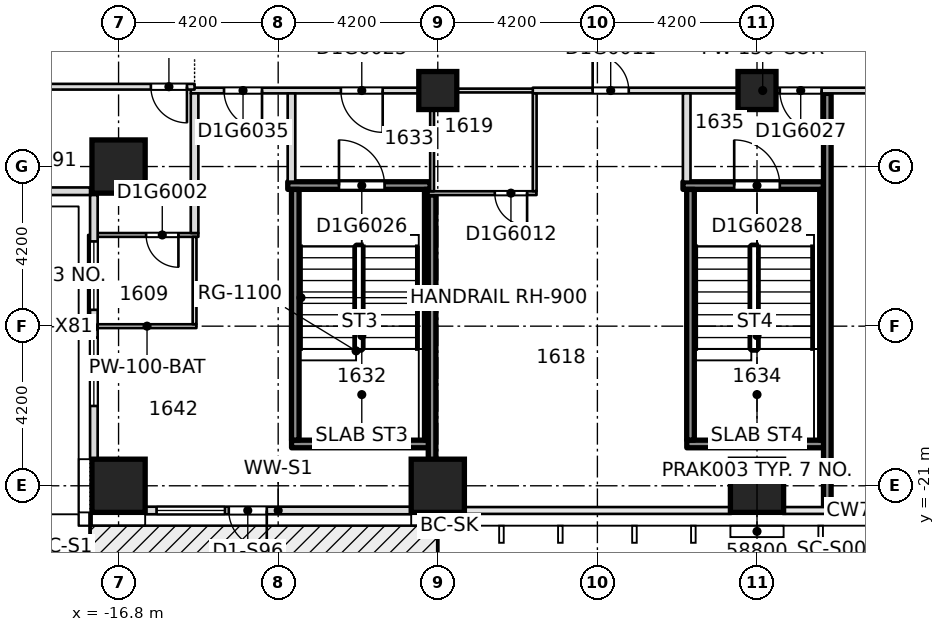
"""IFC4 building model, lengths in metres.
Left out: names, types, materials, properties, quantities, classifications, styles, units other than length and angle.
Written with IfcOpenShell. Run it as: python <this file> out.ifc"""

import sys

from ifc_helpers import new_model, si_unit, direction, frame, frame_2d, origin, origin_2d, place, context, subcontext, project, spatial, rectangle, extrude, element, fill, save


model = new_model("IFC4")
c1 = context("Model", 3, precision=1e-05, world=origin(), true_north=direction((0.0, 1.0)))
c2 = subcontext(c1, "Body", "Model", "MODEL_VIEW")
j1 = project(units=[si_unit("LENGTHUNIT", "METRE"), si_unit("PLANEANGLEUNIT", "RADIAN")], contexts=[c1])
p1 = place(None, origin())
s1 = spatial("IfcSite", under=j1, at=p1, CompositionType="ELEMENT")
p2 = place(p1, origin())
s2 = spatial("IfcBuilding", under=s1, at=p2, CompositionType="ELEMENT")
p3 = place(p2, frame((0.0, 0.0, 69.0)))
s3 = spatial("IfcBuildingStorey", under=s2, at=p3, CompositionType="ELEMENT", Elevation=69.0)
for number, where, z_axis, x_axis in (
    (1, (-16.8, -21.0, -0.32), (0.0, 0.0, 1.0), (1.0, 0.0, 0.0)),
    (2, (-8.4, -21.0, -0.32), (0.0, 0.0, 1.0), (1.0, 0.0, 0.0)),
    (3, (0.0, -21.0, -0.32), (0.0, 0.0, 1.0), (1.0, 0.0, 0.0)),
    (4, (-16.8, -12.6, -0.32), (0.0, 0.0, 1.0), (1.0, 0.0, 0.0)),
):
    element("IfcColumn", number, at=place(p3, frame(where, z_axis=z_axis, x_axis=x_axis)), inside=s3, PredefinedType="COLUMN", context=c2, shape_type="SweptSolid", body=[
        extrude(rectangle(XDim=1.4, YDim=1.4, at=origin_2d()), origin(), (0.0, 0.0, 1.0), 3.45),
    ])
for number, where, z_axis, x_axis in (
    (5, (-8.4, -10.6, -0.32), (0.0, 0.0, 1.0), (1.0, 0.0, 0.0)),
    (6, (0.0, -10.6, -0.32), (0.0, 0.0, 1.0), (1.0, 0.0, 0.0)),
):
    element("IfcColumn", number, at=place(p3, frame(where, z_axis=z_axis, x_axis=x_axis)), inside=s3, PredefinedType="COLUMN", context=c2, shape_type="SweptSolid", body=[
        extrude(rectangle(XDim=1.0, YDim=1.0, at=origin_2d()), origin(), (0.0, 0.0, 1.0), 3.45),
    ])
p4 = place(p3, frame((-12.248, -19.9, 0.0), z_axis=(0.0, 0.0, 1.0), x_axis=(1.0, 0.0, 0.0)))
e7 = element("IfcWall", 7, at=p4, inside=s3, PredefinedType="SOLIDWALL", context=c2, shape_type="SweptSolid", body=[
    extrude(rectangle(XDim=3.696, YDim=0.2, at=frame_2d((1.848, 0.0))), origin(), (0.0, 0.0, 1.0), 3.13),
])
p5 = place(p3, frame((-1.848, -19.9, 0.0), z_axis=(0.0, 0.0, 1.0), x_axis=(1.0, 0.0, 0.0)))
e8 = element("IfcWall", 8, at=p5, inside=s3, PredefinedType="SOLIDWALL", context=c2, shape_type="SweptSolid", body=[
    extrude(rectangle(XDim=3.696, YDim=0.2, at=frame_2d((1.848, 0.0))), origin(), (0.0, 0.0, 1.0), 3.13),
])
p6 = place(p3, frame((-17.35, -16.8, 0.0), z_axis=(0.0, 0.0, 1.0), x_axis=(1.0, 0.0, 0.0)))
e9 = element("IfcWall", 9, at=p6, inside=s3, PredefinedType="PARTITIONING", context=c2, shape_type="SweptSolid", body=[
    extrude(rectangle(XDim=2.598, YDim=0.1, at=frame_2d((1.299, 0.0))), origin(), (0.0, 0.0, 1.0), 3.13),
])
p7 = place(p3, frame((-17.35, -14.4, 0.0), z_axis=(0.0, 0.0, 1.0), x_axis=(1.0, 0.0, 0.0)))
e10 = element("IfcWall", 10, at=p7, inside=s3, PredefinedType="PARTITIONING", context=c2, shape_type="SweptSolid", body=[
    extrude(rectangle(XDim=2.65, YDim=0.1, at=frame_2d((1.325, 0.0))), origin(), (0.0, 0.0, 1.0), 3.13),
])
p8 = place(p7, frame((1.275, 0.0, 0.0)))
e11 = element("IfcOpeningElement", 11, at=p8, cuts=e10, PredefinedType="OPENING", context=c2, shape_type="SweptSolid", body=[
    extrude(rectangle(XDim=0.85, YDim=2.1, at=frame_2d((0.425, 1.05))), frame((0.0, 0.06, 0.0), z_axis=(0.0, -1.0, 0.0), x_axis=(1.0, 0.0, 0.0)), (0.0, 0.0, 1.0), 0.12),
])
p9 = place(p3, frame((-8.65, -13.3, 0.0), z_axis=(0.0, 0.0, 1.0), x_axis=(1.0, 0.0, 0.0)))
e12 = element("IfcWall", 12, at=p9, inside=s3, PredefinedType="PARTITIONING", context=c2, shape_type="SweptSolid", body=[
    extrude(rectangle(XDim=2.848, YDim=0.1, at=frame_2d((1.424, 0.0))), origin(), (0.0, 0.0, 1.0), 3.13),
])
p10 = place(p9, frame((1.75, 0.0, 0.0)))
e13 = element("IfcOpeningElement", 13, at=p10, cuts=e12, PredefinedType="OPENING", context=c2, shape_type="SweptSolid", body=[
    extrude(rectangle(XDim=0.85, YDim=2.1, at=frame_2d((0.425, 1.05))), frame((0.0, 0.06, 0.0), z_axis=(0.0, -1.0, 0.0), x_axis=(1.0, 0.0, 0.0)), (0.0, 0.0, 1.0), 0.12),
])
p11 = place(p3, frame((-12.348, -13.1, 0.0), z_axis=(0.0, 0.0, 1.0), x_axis=(1.0, 0.0, 0.0)))
e14 = element("IfcWall", 14, at=p11, inside=s3, PredefinedType="SOLIDWALL", context=c2, shape_type="SweptSolid", body=[
    extrude(rectangle(XDim=3.746, YDim=0.2, at=frame_2d((1.873, 0.0))), origin(), (0.0, 0.0, 1.0), 3.13),
])
p12 = place(p11, frame((1.348, 0.0, 0.0)))
e15 = element("IfcOpeningElement", 15, at=p12, cuts=e14, PredefinedType="OPENING", context=c2, shape_type="SweptSolid", body=[
    extrude(rectangle(XDim=1.2, YDim=2.1, at=frame_2d((0.6, 1.05))), frame((0.0, 0.11, 0.0), z_axis=(0.0, -1.0, 0.0), x_axis=(1.0, 0.0, 0.0)), (0.0, 0.0, 1.0), 0.22),
])
p13 = place(p3, frame((-1.948, -13.1, 0.0), z_axis=(0.0, 0.0, 1.0), x_axis=(1.0, 0.0, 0.0)))
e16 = element("IfcWall", 16, at=p13, inside=s3, PredefinedType="SOLIDWALL", context=c2, shape_type="SweptSolid", body=[
    extrude(rectangle(XDim=3.696, YDim=0.2, at=frame_2d((1.848, 0.0))), origin(), (0.0, 0.0, 1.0), 3.13),
])
p14 = place(p13, frame((1.348, 0.0, 0.0)))
e17 = element("IfcOpeningElement", 17, at=p14, cuts=e16, PredefinedType="OPENING", context=c2, shape_type="SweptSolid", body=[
    extrude(rectangle(XDim=1.2, YDim=2.1, at=frame_2d((0.6, 1.05))), frame((0.0, 0.11, 0.0), z_axis=(0.0, -1.0, 0.0), x_axis=(1.0, 0.0, 0.0)), (0.0, 0.0, 1.0), 0.22),
])
p15 = place(p3, frame((-14.9, -10.6, 0.0), z_axis=(0.0, 0.0, 1.0), x_axis=(1.0, 0.0, 0.0)))
e18 = element("IfcWall", 18, at=p15, inside=s3, PredefinedType="PARTITIONING", context=c2, shape_type="SweptSolid", body=[
    extrude(rectangle(XDim=6.4, YDim=0.15, at=frame_2d((3.2, 0.0))), origin(), (0.0, 0.0, 1.0), 3.13),
])
p16 = place(p15, frame((3.95, 0.0, 0.0)))
e19 = element("IfcOpeningElement", 19, at=p16, cuts=e18, PredefinedType="OPENING", context=c2, shape_type="SweptSolid", body=[
    extrude(rectangle(XDim=1.1, YDim=2.1, at=frame_2d((0.55, 1.05))), frame((0.0, 0.085, 0.0), z_axis=(0.0, -1.0, 0.0), x_axis=(1.0, 0.0, 0.0)), (0.0, 0.0, 1.0), 0.17),
])
p17 = place(p15, frame((0.875, 0.0, 0.0)))
e20 = element("IfcOpeningElement", 20, at=p17, cuts=e18, PredefinedType="OPENING", context=c2, shape_type="SweptSolid", body=[
    extrude(rectangle(XDim=1.0, YDim=2.1, at=frame_2d((0.5, 1.05))), frame((0.0, 0.085, 0.0), z_axis=(0.0, -1.0, 0.0), x_axis=(1.0, 0.0, 0.0)), (0.0, 0.0, 1.0), 0.17),
])
p18 = place(p3, frame((-8.6, -10.6, 0.0), z_axis=(0.0, 0.0, 1.0), x_axis=(1.0, 0.0, 0.0)))
e21 = element("IfcWall", 21, at=p18, inside=s3, PredefinedType="PARTITIONING", context=c2, shape_type="SweptSolid", body=[
    extrude(rectangle(XDim=2.8, YDim=0.1, at=frame_2d((1.4, 0.0))), origin(), (0.0, 0.0, 1.0), 3.13),
])
p19 = place(p3, frame((-5.9, -10.6, 0.0), z_axis=(0.0, 0.0, 1.0), x_axis=(1.0, 0.0, 0.0)))
e22 = element("IfcWall", 22, at=p19, inside=s3, PredefinedType="PARTITIONING", context=c2, shape_type="SweptSolid", body=[
    extrude(rectangle(XDim=12.1, YDim=0.15, at=frame_2d((6.05, 0.0))), origin(), (0.0, 0.0, 1.0), 3.13),
])
p20 = place(p19, frame((1.575, 0.0, 0.0)))
e23 = element("IfcOpeningElement", 23, at=p20, cuts=e22, PredefinedType="OPENING", context=c2, shape_type="SweptSolid", body=[
    extrude(rectangle(XDim=0.95, YDim=2.1, at=frame_2d((0.475, 1.05))), frame((0.0, 0.085, 0.0), z_axis=(0.0, -1.0, 0.0), x_axis=(1.0, 0.0, 0.0)), (0.0, 0.0, 1.0), 0.17),
])
p21 = place(p19, frame((9.425, 0.0, 0.0)))
e24 = element("IfcOpeningElement", 24, at=p21, cuts=e22, PredefinedType="OPENING", context=c2, shape_type="SweptSolid", body=[
    extrude(rectangle(XDim=0.95, YDim=2.1, at=frame_2d((0.475, 1.05))), frame((0.0, 0.085, 0.0), z_axis=(0.0, -1.0, 0.0), x_axis=(1.0, 0.0, 0.0)), (0.0, 0.0, 1.0), 0.17),
])
p22 = place(p19, frame((6.5, 0.0, 0.0)))
e25 = element("IfcOpeningElement", 25, at=p22, cuts=e22, PredefinedType="OPENING", context=c2, shape_type="SweptSolid", body=[
    extrude(rectangle(XDim=1.1, YDim=2.1, at=frame_2d((0.55, 1.05))), frame((0.0, 0.085, 0.0), z_axis=(0.0, -1.0, 0.0), x_axis=(1.0, 0.0, 0.0)), (0.0, 0.0, 1.0), 0.17),
])
p23 = place(p3, frame((-25.75, -10.5, 0.0), z_axis=(0.0, 0.0, 1.0), x_axis=(1.0, 0.0, 0.0)))
e26 = element("IfcWall", 26, at=p23, inside=s3, PredefinedType="PARTITIONING", context=c2, shape_type="SweptSolid", body=[
    extrude(rectangle(XDim=10.95, YDim=0.15, at=frame_2d((5.475, 0.0))), origin(), (0.0, 0.0, 1.0), 3.13),
])
p24 = place(p23, frame((9.8, 0.0, 0.0)))
e27 = element("IfcOpeningElement", 27, at=p24, cuts=e26, PredefinedType="OPENING", context=c2, shape_type="SweptSolid", body=[
    extrude(rectangle(XDim=0.95, YDim=2.1, at=frame_2d((0.475, 1.05))), frame((0.0, 0.085, 0.0), z_axis=(0.0, -1.0, 0.0), x_axis=(1.0, 0.0, 0.0)), (0.0, 0.0, 1.0), 0.17),
])
p25 = place(p3, frame((-17.55, -16.75, 0.0), z_axis=(0.0, 0.0, 1.0), x_axis=(0.0, 1.0, 0.0)))
e28 = element("IfcWall", 28, at=p25, inside=s3, PredefinedType="PARTITIONING", context=c2, shape_type="SweptSolid", body=[
    extrude(rectangle(XDim=2.35, YDim=0.1, at=frame_2d((1.175, 0.0))), origin(), (0.0, 0.0, 1.0), 3.13),
])
p26 = place(p3, frame((-14.8, -16.748, 0.0), z_axis=(0.0, 0.0, 1.0), x_axis=(0.0, 1.0, 0.0)))
e29 = element("IfcWall", 29, at=p26, inside=s3, PredefinedType="PARTITIONING", context=c2, shape_type="SweptSolid", body=[
    extrude(rectangle(XDim=2.298, YDim=0.1, at=frame_2d((1.149, 0.0))), origin(), (0.0, 0.0, 1.0), 3.13),
])
p27 = place(p3, frame((-14.8, -14.35, 0.0), z_axis=(0.0, 0.0, 1.0), x_axis=(0.0, 1.0, 0.0)))
e30 = element("IfcWall", 30, at=p27, inside=s3, PredefinedType="PARTITIONING", context=c2, shape_type="SweptSolid", body=[
    extrude(rectangle(XDim=3.675, YDim=0.2, at=frame_2d((1.837, 0.0))), origin(), (0.0, 0.0, 1.0), 3.13),
])
p28 = place(p3, frame((-12.25, -12.998, 0.0), z_axis=(0.0, 0.0, 1.0), x_axis=(0.0, 1.0, 0.0)))
e31 = element("IfcWall", 31, at=p28, inside=s3, PredefinedType="PARTITIONING", context=c2, shape_type="SweptSolid", body=[
    extrude(rectangle(XDim=2.323, YDim=0.2, at=frame_2d((1.162, 0.0))), origin(), (0.0, 0.0, 1.0), 3.13),
])
for number, where, z_axis, x_axis in (
    (32, (-12.15, -19.798, 0.0), (0.0, 0.0, 1.0), (0.0, 1.0, 0.0)),
    (33, (-8.65, -19.798, 0.0), (0.0, 0.0, 1.0), (0.0, 1.0, 0.0)),
):
    element("IfcWall", number, at=place(p3, frame(where, z_axis=z_axis, x_axis=x_axis)), inside=s3, PredefinedType="SOLIDWALL", context=c2, shape_type="SweptSolid", body=[
        extrude(rectangle(XDim=6.596, YDim=0.2, at=frame_2d((3.298, 0.0))), origin(), (0.0, 0.0, 1.0), 3.13),
    ])
p29 = place(p3, frame((-8.55, -13.25, 0.0), z_axis=(0.0, 0.0, 1.0), x_axis=(0.0, 1.0, 0.0)))
e34 = element("IfcWall", 34, at=p29, inside=s3, PredefinedType="PARTITIONING", context=c2, shape_type="SweptSolid", body=[
    extrude(rectangle(XDim=2.575, YDim=0.1, at=frame_2d((1.288, 0.0))), origin(), (0.0, 0.0, 1.0), 3.13),
])
p30 = place(p3, frame((-5.85, -13.248, 0.0), z_axis=(0.0, 0.0, 1.0), x_axis=(0.0, 1.0, 0.0)))
e35 = element("IfcWall", 35, at=p30, inside=s3, PredefinedType="PARTITIONING", context=c2, shape_type="SweptSolid", body=[
    extrude(rectangle(XDim=2.573, YDim=0.1, at=frame_2d((1.287, 0.0))), origin(), (0.0, 0.0, 1.0), 3.13),
])
p31 = place(p3, frame((-1.85, -12.998, 0.0), z_axis=(0.0, 0.0, 1.0), x_axis=(0.0, 1.0, 0.0)))
e36 = element("IfcWall", 36, at=p31, inside=s3, PredefinedType="PARTITIONING", context=c2, shape_type="SweptSolid", body=[
    extrude(rectangle(XDim=2.323, YDim=0.2, at=frame_2d((1.162, 0.0))), origin(), (0.0, 0.0, 1.0), 3.13),
])
for number, where, z_axis, x_axis in (
    (37, (-1.75, -19.798, 0.0), (0.0, 0.0, 1.0), (0.0, 1.0, 0.0)),
    (38, (1.75, -19.798, 0.0), (0.0, 0.0, 1.0), (0.0, 1.0, 0.0)),
):
    element("IfcWall", number, at=place(p3, frame(where, z_axis=z_axis, x_axis=x_axis)), inside=s3, PredefinedType="SOLIDWALL", context=c2, shape_type="SweptSolid", body=[
        extrude(rectangle(XDim=6.596, YDim=0.2, at=frame_2d((3.298, 0.0))), origin(), (0.0, 0.0, 1.0), 3.13),
    ])
p32 = place(p3, frame((-16.1, -21.65, 0.0), z_axis=(0.0, 0.0, 1.0), x_axis=(1.0, 0.0, 0.0)))
e39 = element("IfcWall", 39, at=p32, inside=s3, PredefinedType="STANDARD", context=c2, shape_type="SweptSolid", body=[
    extrude(rectangle(XDim=7.0, YDim=0.2, at=frame_2d((3.5, 0.0))), origin(), (0.0, 0.0, 1.0), 3.13),
])
p33 = place(p32, frame((0.3, 0.0, 0.2)))
e40 = element("IfcOpeningElement", 40, at=p33, cuts=e39, PredefinedType="OPENING", context=c2, shape_type="SweptSolid", body=[
    extrude(rectangle(XDim=1.8, YDim=2.65, at=frame_2d((0.9, 1.325))), frame((0.0, 0.11, 0.0), z_axis=(0.0, -1.0, 0.0), x_axis=(1.0, 0.0, 0.0)), (0.0, 0.0, 1.0), 0.22),
])
p34 = place(p32, frame((2.2, 0.0, 0.0)))
e41 = element("IfcOpeningElement", 41, at=p34, cuts=e39, PredefinedType="OPENING", context=c2, shape_type="SweptSolid", body=[
    extrude(rectangle(XDim=1.0, YDim=2.4, at=frame_2d((0.5, 1.2))), frame((0.0, 0.11, 0.0), z_axis=(0.0, -1.0, 0.0), x_axis=(1.0, 0.0, 0.0)), (0.0, 0.0, 1.0), 0.22),
])
p35 = place(p3, frame((-24.5, -13.25, 0.0), z_axis=(0.0, 0.0, 1.0), x_axis=(1.0, 0.0, 0.0)))
e42 = element("IfcWall", 42, at=p35, inside=s3, PredefinedType="STANDARD", context=c2, shape_type="SweptSolid", body=[
    extrude(rectangle(XDim=6.95, YDim=0.2, at=frame_2d((3.475, 0.0))), origin(), (0.0, 0.0, 1.0), 3.13),
])
p36 = place(p35, frame((2.6, 0.0, 0.2)))
e43 = element("IfcOpeningElement", 43, at=p36, cuts=e42, PredefinedType="OPENING", context=c2, shape_type="SweptSolid", body=[
    extrude(rectangle(XDim=1.8, YDim=2.65, at=frame_2d((0.9, 1.325))), frame((0.0, 0.11, 0.0), z_axis=(0.0, -1.0, 0.0), x_axis=(1.0, 0.0, 0.0)), (0.0, 0.0, 1.0), 0.22),
])
p37 = place(p3, frame((-17.45, -13.35, 0.0), z_axis=(0.0, 0.0, 1.0), x_axis=(0.0, -1.0, 0.0)))
e44 = element("IfcWall", 44, at=p37, inside=s3, PredefinedType="STANDARD", context=c2, shape_type="SweptSolid", body=[
    extrude(rectangle(XDim=6.95, YDim=0.2, at=frame_2d((3.475, 0.0))), origin(), (0.0, 0.0, 1.0), 3.13),
])
p38 = place(p37, frame((3.75, 0.0, 0.2)))
e45 = element("IfcOpeningElement", 45, at=p38, cuts=e44, PredefinedType="OPENING", context=c2, shape_type="SweptSolid", body=[
    extrude(rectangle(XDim=1.8, YDim=2.65, at=frame_2d((0.9, 1.325))), frame((0.0, 0.11, 0.0), z_axis=(0.0, -1.0, 0.0), x_axis=(1.0, 0.0, 0.0)), (0.0, 0.0, 1.0), 0.22),
])
p39 = place(p37, frame((1.22, 0.0, 0.2)))
e46 = element("IfcOpeningElement", 46, at=p39, cuts=e44, PredefinedType="OPENING", context=c2, shape_type="SweptSolid", body=[
    extrude(rectangle(XDim=1.8, YDim=2.65, at=frame_2d((0.9, 1.325))), frame((0.0, 0.11, 0.0), z_axis=(0.0, -1.0, 0.0), x_axis=(1.0, 0.0, 0.0)), (0.0, 0.0, 1.0), 0.22),
])
p40 = place(p3, frame((1.85, -21.55, 0.0), z_axis=(0.0, 0.0, 1.0), x_axis=(0.0, 1.0, 0.0)))
e47 = element("IfcWall", 47, at=p40, inside=s3, PredefinedType="SOLIDWALL", context=c2, shape_type="SweptSolid", body=[
    extrude(rectangle(XDim=10.875, YDim=0.2, at=frame_2d((5.438, 0.0))), origin(), (0.0, 0.0, 1.0), 3.13),
])
p41 = place(p3, frame((-8.55, -21.55, 0.0), z_axis=(0.0, 0.0, 1.0), x_axis=(0.0, 1.0, 0.0)))
e48 = element("IfcWall", 48, at=p41, inside=s3, PredefinedType="SOLIDWALL", context=c2, shape_type="SweptSolid", body=[
    extrude(rectangle(XDim=8.2, YDim=0.2, at=frame_2d((4.1, 0.0))), origin(), (0.0, 0.0, 1.0), 3.13),
])
p42 = place(p24, origin())
e49 = element("IfcDoor", 49, at=p42, inside=s3, OperationType="SINGLE_SWING_RIGHT", PredefinedType="DOOR", context=c2, shape_type="SweptSolid", body=[
    extrude(rectangle(XDim=0.95, YDim=2.1, at=frame_2d((0.475, 1.05))), frame((0.0, 0.025, 0.0), z_axis=(0.0, -1.0, 0.0), x_axis=(1.0, 0.0, 0.0)), (0.0, 0.0, 1.0), 0.05),
])
fill(e27, e49)
p43 = place(p8, origin())
e50 = element("IfcDoor", 50, at=p43, inside=s3, OperationType="SINGLE_SWING_RIGHT", PredefinedType="DOOR", context=c2, shape_type="SweptSolid", body=[
    extrude(rectangle(XDim=0.85, YDim=2.1, at=frame_2d((0.425, 1.05))), frame((0.0, 0.025, 0.0), z_axis=(0.0, -1.0, 0.0), x_axis=(1.0, 0.0, 0.0)), (0.0, 0.0, 1.0), 0.05),
])
fill(e11, e50)
p44 = place(p20, origin())
e51 = element("IfcDoor", 51, at=p44, inside=s3, OperationType="SINGLE_SWING_LEFT", PredefinedType="DOOR", context=c2, shape_type="SweptSolid", body=[
    extrude(rectangle(XDim=0.95, YDim=2.1, at=frame_2d((0.475, 1.05))), frame((0.0, 0.025, 0.0), z_axis=(0.0, -1.0, 0.0), x_axis=(1.0, 0.0, 0.0)), (0.0, 0.0, 1.0), 0.05),
])
fill(e23, e51)
p45 = place(p10, origin())
e52 = element("IfcDoor", 52, at=p45, inside=s3, OperationType="SINGLE_SWING_RIGHT", PredefinedType="DOOR", context=c2, shape_type="SweptSolid", body=[
    extrude(rectangle(XDim=0.85, YDim=2.1, at=frame_2d((0.425, 1.05))), frame((0.0, 0.025, 0.0), z_axis=(0.0, -1.0, 0.0), x_axis=(1.0, 0.0, 0.0)), (0.0, 0.0, 1.0), 0.05),
])
fill(e13, e52)
p46 = place(p16, origin())
e53 = element("IfcDoor", 53, at=p46, inside=s3, OperationType="SINGLE_SWING_RIGHT", PredefinedType="DOOR", context=c2, shape_type="SweptSolid", body=[
    extrude(rectangle(XDim=1.1, YDim=2.1, at=frame_2d((0.55, 1.05))), frame((0.0, 0.025, 0.0), z_axis=(0.0, -1.0, 0.0), x_axis=(1.0, 0.0, 0.0)), (0.0, 0.0, 1.0), 0.05),
])
fill(e19, e53)
p47 = place(p12, origin())
e54 = element("IfcDoor", 54, at=p47, inside=s3, OperationType="SINGLE_SWING_RIGHT", PredefinedType="DOOR", context=c2, shape_type="SweptSolid", body=[
    extrude(rectangle(XDim=1.2, YDim=2.1, at=frame_2d((0.6, 1.05))), frame((0.0, 0.025, 0.0), z_axis=(0.0, -1.0, 0.0), x_axis=(1.0, 0.0, 0.0)), (0.0, 0.0, 1.0), 0.05),
])
fill(e15, e54)
p48 = place(p22, origin())
e55 = element("IfcDoor", 55, at=p48, inside=s3, OperationType="SINGLE_SWING_LEFT", PredefinedType="DOOR", context=c2, shape_type="SweptSolid", body=[
    extrude(rectangle(XDim=1.1, YDim=2.1, at=frame_2d((0.55, 1.05))), frame((0.0, 0.025, 0.0), z_axis=(0.0, -1.0, 0.0), x_axis=(1.0, 0.0, 0.0)), (0.0, 0.0, 1.0), 0.05),
])
fill(e25, e55)
p49 = place(p14, origin())
e56 = element("IfcDoor", 56, at=p49, inside=s3, OperationType="SINGLE_SWING_RIGHT", PredefinedType="DOOR", context=c2, shape_type="SweptSolid", body=[
    extrude(rectangle(XDim=1.2, YDim=2.1, at=frame_2d((0.6, 1.05))), frame((0.0, 0.025, 0.0), z_axis=(0.0, -1.0, 0.0), x_axis=(1.0, 0.0, 0.0)), (0.0, 0.0, 1.0), 0.05),
])
fill(e17, e56)
p50 = place(p17, origin())
e57 = element("IfcDoor", 57, at=p50, inside=s3, OperationType="SINGLE_SWING_RIGHT", PredefinedType="DOOR", context=c2, shape_type="SweptSolid", body=[
    extrude(rectangle(XDim=1.0, YDim=2.1, at=frame_2d((0.5, 1.05))), frame((0.0, 0.025, 0.0), z_axis=(0.0, -1.0, 0.0), x_axis=(1.0, 0.0, 0.0)), (0.0, 0.0, 1.0), 0.05),
])
fill(e20, e57)
p51 = place(p33, origin())
e58 = element("IfcWindow", 58, at=p51, inside=s3, PartitioningType="SINGLE_PANEL", PredefinedType="WINDOW", context=c2, shape_type="SweptSolid", body=[
    extrude(rectangle(XDim=1.8, YDim=2.65, at=frame_2d((0.9, 1.325))), frame((0.0, 0.03, 0.0), z_axis=(0.0, -1.0, 0.0), x_axis=(1.0, 0.0, 0.0)), (0.0, 0.0, 1.0), 0.06),
])
fill(e40, e58)
p52 = place(p34, origin())
e59 = element("IfcDoor", 59, at=p52, inside=s3, OperationType="SINGLE_SWING_LEFT", PredefinedType="DOOR", context=c2, shape_type="SweptSolid", body=[
    extrude(rectangle(XDim=1.0, YDim=2.4, at=frame_2d((0.5, 1.2))), frame((0.0, 0.025, 0.0), z_axis=(0.0, -1.0, 0.0), x_axis=(1.0, 0.0, 0.0)), (0.0, 0.0, 1.0), 0.05),
])
fill(e41, e59)
p53 = place(p38, origin())
e60 = element("IfcWindow", 60, at=p53, inside=s3, PartitioningType="SINGLE_PANEL", PredefinedType="WINDOW", context=c2, shape_type="SweptSolid", body=[
    extrude(rectangle(XDim=1.8, YDim=2.65, at=frame_2d((0.9, 1.325))), frame((0.0, 0.03, 0.0), z_axis=(0.0, -1.0, 0.0), x_axis=(1.0, 0.0, 0.0)), (0.0, 0.0, 1.0), 0.06),
])
fill(e45, e60)
p54 = place(p39, origin())
e61 = element("IfcWindow", 61, at=p54, inside=s3, PartitioningType="SINGLE_PANEL", PredefinedType="WINDOW", context=c2, shape_type="SweptSolid", body=[
    extrude(rectangle(XDim=1.8, YDim=2.65, at=frame_2d((0.9, 1.325))), frame((0.0, 0.03, 0.0), z_axis=(0.0, -1.0, 0.0), x_axis=(1.0, 0.0, 0.0)), (0.0, 0.0, 1.0), 0.06),
])
fill(e46, e61)
save(model, sys.argv[1])
